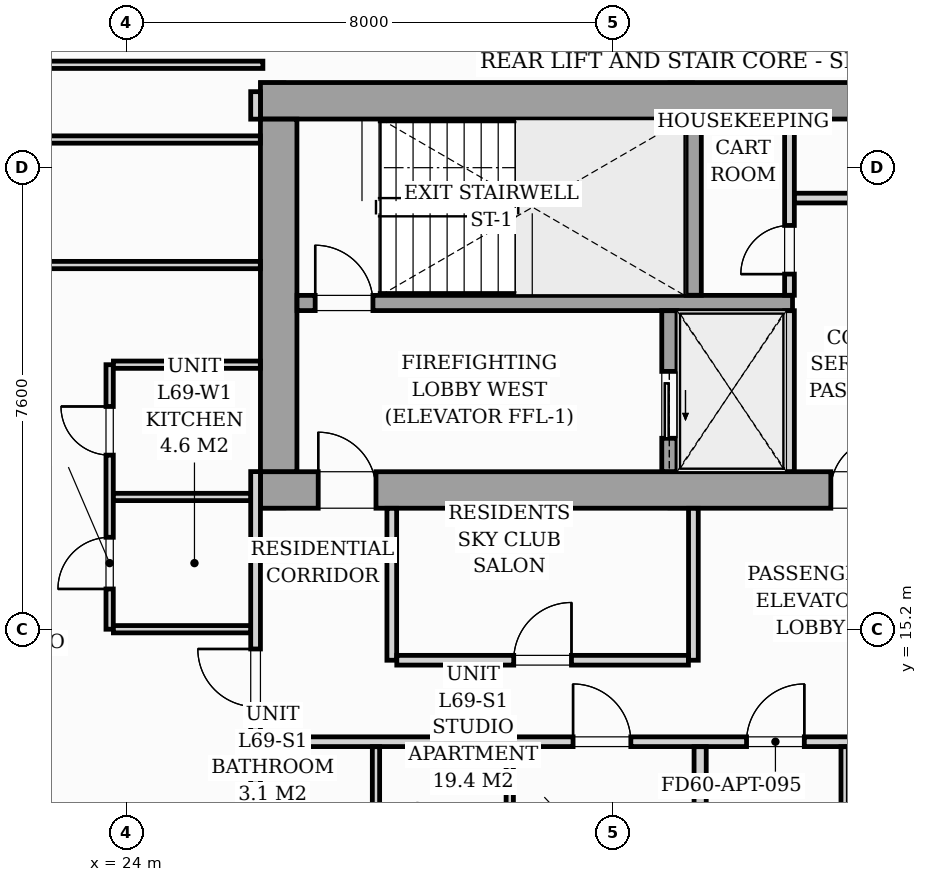
"""IFC4 building model, lengths in metres.
Left out: names, types, materials, properties, quantities, classifications, styles, units other than length and angle.
Written with IfcOpenShell. Run it as: python <this file> out.ifc"""

import sys

from ifc_helpers import new_model, si_unit, direction, frame, frame_2d, origin, origin_2d, place, context, subcontext, project, spatial, rectangle, i_section, extrude, source, transform, mapped, element, fill, save


model = new_model("IFC4")
c1 = context("Model", 3, precision=1e-05, world=origin(), true_north=direction((0.0, 1.0)))
c2 = subcontext(c1, "Body", "Model", "MODEL_VIEW")
j1 = project(units=[si_unit("LENGTHUNIT", "METRE"), si_unit("PLANEANGLEUNIT", "RADIAN")], contexts=[c1])
p1 = place(None, origin())
s1 = spatial("IfcSite", under=j1, at=p1, CompositionType="ELEMENT")
p2 = place(p1, origin())
s2 = spatial("IfcBuilding", under=s1, at=p2, CompositionType="ELEMENT")
p3 = place(p2, frame((0.0, 0.0, 239.7)))
s3 = spatial("IfcBuildingStorey", under=s2, at=p3, CompositionType="ELEMENT", Elevation=239.7)
m1 = source(origin(), c2, "Body", "SweptSolid", [
    extrude(i_section(OverallWidth=0.409, OverallDepth=0.425, WebThickness=0.033, FlangeThickness=0.052, FilletRadius=0.018, at=origin_2d()), origin(), (0.0, 0.0, 1.0), 3.296),
])
for number, where, z_axis, x_axis in (
    (1, (26.4, 17.4, 0.002), (0.0, 0.0, 1.0), (1.0, 0.0, 0.0)),
    (2, (33.12, 17.4, 0.002), (0.0, 0.0, 1.0), (1.0, 0.0, 0.0)),
    (3, (26.4, 24.0, 0.002), (0.0, 0.0, 1.0), (1.0, 0.0, 0.0)),
    (4, (33.12, 24.0, 0.002), (0.0, 0.0, 1.0), (1.0, 0.0, 0.0)),
):
    element("IfcColumn", number, at=place(p3, frame(where, z_axis=z_axis, x_axis=x_axis)), inside=s3, PredefinedType="PILASTER", context=c2, shape_type="MappedRepresentation", body=[
        mapped(m1, transform((0.0, 0.0, 0.0), scale=1.0)),
    ])
p4 = place(p3, frame((26.2, 17.5, 0.0), z_axis=(0.0, 0.0, 1.0), x_axis=(1.0, 0.0, 0.0)))
e5 = element("IfcWall", 5, at=p4, inside=s3, PredefinedType="SHEAR", context=c2, shape_type="SweptSolid", body=[
    extrude(rectangle(XDim=19.6, YDim=0.6, at=frame_2d((9.8, 0.0))), origin(), (0.0, 0.0, 1.0), 3.3),
])
p5 = place(p4, frame((0.95, 0.0, 0.0)))
e6 = element("IfcOpeningElement", 6, at=p5, cuts=e5, PredefinedType="OPENING", context=c2, shape_type="SweptSolid", body=[
    extrude(rectangle(XDim=0.95, YDim=2.06, at=frame_2d((0.475, 1.03))), frame((0.0, 0.31, 0.0), z_axis=(0.0, -1.0, 0.0), x_axis=(1.0, 0.0, 0.0)), (0.0, 0.0, 1.0), 0.62),
])
p6 = place(p4, frame((9.38, 0.0, 0.0)))
e7 = element("IfcOpeningElement", 7, at=p6, cuts=e5, PredefinedType="OPENING", context=c2, shape_type="SweptSolid", body=[
    extrude(rectangle(XDim=0.85, YDim=2.0, at=frame_2d((0.425, 1.0))), frame((0.0, 0.31, 0.0), z_axis=(0.0, -1.0, 0.0), x_axis=(1.0, 0.0, 0.0)), (0.0, 0.0, 1.0), 0.62),
])
p7 = place(p4, frame((17.55, 0.0, 0.0)))
e8 = element("IfcOpeningElement", 8, at=p7, cuts=e5, PredefinedType="OPENING", context=c2, shape_type="SweptSolid", body=[
    extrude(rectangle(XDim=0.95, YDim=2.06, at=frame_2d((0.475, 1.03))), frame((0.0, 0.31, 0.0), z_axis=(0.0, -1.0, 0.0), x_axis=(1.0, 0.0, 0.0)), (0.0, 0.0, 1.0), 0.62),
])
p8 = place(p3, frame((26.2, 23.9, 0.0), z_axis=(0.0, 0.0, 1.0), x_axis=(1.0, 0.0, 0.0)))
e9 = element("IfcWall", 9, at=p8, inside=s3, PredefinedType="SHEAR", context=c2, shape_type="SweptSolid", body=[
    extrude(rectangle(XDim=19.6, YDim=0.6, at=frame_2d((9.8, 0.0))), origin(), (0.0, 0.0, 1.0), 3.3),
])
p9 = place(p3, frame((26.5, 17.802, 0.0), z_axis=(0.0, 0.0, 1.0), x_axis=(0.0, 1.0, 0.0)))
e10 = element("IfcWall", 10, at=p9, inside=s3, PredefinedType="SHEAR", context=c2, shape_type="SweptSolid", body=[
    extrude(rectangle(XDim=5.796, YDim=0.6, at=frame_2d((2.898, 0.0))), origin(), (0.0, 0.0, 1.0), 3.3),
])
p10 = place(p3, frame((26.802, 20.575, 0.0), z_axis=(0.0, 0.0, 1.0), x_axis=(1.0, 0.0, 0.0)))
e11 = element("IfcWall", 11, at=p10, inside=s3, PredefinedType="SOLIDWALL", context=c2, shape_type="SweptSolid", body=[
    extrude(rectangle(XDim=8.148, YDim=0.25, at=frame_2d((4.074, 0.0))), origin(), (0.0, 0.0, 1.0), 3.3),
])
p11 = place(p10, frame((0.298, 0.0, 0.0)))
e12 = element("IfcOpeningElement", 12, at=p11, cuts=e11, PredefinedType="OPENING", context=c2, shape_type="SweptSolid", body=[
    extrude(rectangle(XDim=0.95, YDim=2.06, at=frame_2d((0.475, 1.03))), frame((0.0, 0.135, 0.0), z_axis=(0.0, -1.0, 0.0), x_axis=(1.0, 0.0, 0.0)), (0.0, 0.0, 1.0), 0.27),
])
p12 = place(p3, frame((33.325, 20.702, 0.0), z_axis=(0.0, 0.0, 1.0), x_axis=(0.0, 1.0, 0.0)))
e13 = element("IfcWall", 13, at=p12, inside=s3, PredefinedType="SOLIDWALL", context=c2, shape_type="SweptSolid", body=[
    extrude(rectangle(XDim=2.896, YDim=0.25, at=frame_2d((1.448, 0.0))), origin(), (0.0, 0.0, 1.0), 3.3),
])
p13 = place(p3, frame((32.925, 17.802, 0.0), z_axis=(0.0, 0.0, 1.0), x_axis=(0.0, 1.0, 0.0)))
e14 = element("IfcWall", 14, at=p13, inside=s3, PredefinedType="SOLIDWALL", context=c2, shape_type="SweptSolid", body=[
    extrude(rectangle(XDim=2.646, YDim=0.25, at=frame_2d((1.323, 0.0))), origin(), (0.0, 0.0, 1.0), 3.3),
])
p14 = place(p13, frame((0.548, 0.0, 0.0)))
e15 = element("IfcOpeningElement", 15, at=p14, cuts=e14, PredefinedType="OPENING", context=c2, shape_type="SweptSolid", body=[
    extrude(rectangle(XDim=1.1, YDim=2.08, at=frame_2d((0.55, 1.04))), frame((0.0, 0.135, 0.0), z_axis=(0.0, -1.0, 0.0), x_axis=(1.0, 0.0, 0.0)), (0.0, 0.0, 1.0), 0.27),
])
p15 = place(p3, frame((34.9, 17.802, 0.0), z_axis=(0.0, 0.0, 1.0), x_axis=(0.0, 1.0, 0.0)))
e16 = element("IfcWall", 16, at=p15, inside=s3, PredefinedType="PARTITIONING", context=c2, shape_type="SweptSolid", body=[
    extrude(rectangle(XDim=2.646, YDim=0.16, at=frame_2d((1.323, 0.0))), origin(), (0.0, 0.0, 1.0), 3.04),
])
p16 = place(p3, frame((34.9, 20.702, 0.0), z_axis=(0.0, 0.0, 1.0), x_axis=(0.0, 1.0, 0.0)))
e17 = element("IfcWall", 17, at=p16, inside=s3, PredefinedType="PARTITIONING", context=c2, shape_type="SweptSolid", body=[
    extrude(rectangle(XDim=2.896, YDim=0.16, at=frame_2d((1.448, 0.0))), origin(), (0.0, 0.0, 1.0), 3.04),
])
p17 = place(p16, frame((0.348, 0.0, 0.0)))
e18 = element("IfcOpeningElement", 18, at=p17, cuts=e17, PredefinedType="OPENING", context=c2, shape_type="SweptSolid", body=[
    extrude(rectangle(XDim=0.8, YDim=2.05, at=frame_2d((0.4, 1.025))), frame((0.0, 0.09, 0.0), z_axis=(0.0, -1.0, 0.0), x_axis=(1.0, 0.0, 0.0)), (0.0, 0.0, 1.0), 0.18),
])
p18 = place(p3, frame((34.982, 22.3, 0.0), z_axis=(0.0, 0.0, 1.0), x_axis=(1.0, 0.0, 0.0)))
e19 = element("IfcWall", 19, at=p18, inside=s3, PredefinedType="PARTITIONING", context=c2, shape_type="SweptSolid", body=[
    extrude(rectangle(XDim=3.566, YDim=0.16, at=frame_2d((1.783, 0.0))), origin(), (0.0, 0.0, 1.0), 3.04),
])
p19 = place(p18, frame((1.378, 0.0, 0.0)))
e20 = element("IfcOpeningElement", 20, at=p19, cuts=e19, PredefinedType="OPENING", context=c2, shape_type="SweptSolid", body=[
    extrude(rectangle(XDim=0.8, YDim=2.05, at=frame_2d((0.4, 1.025))), frame((0.0, 0.09, 0.0), z_axis=(0.0, -1.0, 0.0), x_axis=(1.0, 0.0, 0.0)), (0.0, 0.0, 1.0), 0.18),
])
p20 = place(p3, frame((26.12, 13.36, 0.0), z_axis=(0.0, 0.0, 1.0), x_axis=(1.0, 0.0, 0.0)))
e21 = element("IfcWall", 21, at=p20, inside=s3, PredefinedType="PARTITIONING", context=c2, shape_type="SweptSolid", body=[
    extrude(rectangle(XDim=19.76, YDim=0.16, at=frame_2d((9.88, 0.0))), origin(), (0.0, 0.0, 1.0), 2.605),
])
p21 = place(p20, frame((5.221, 0.0, 0.0)))
e22 = element("IfcOpeningElement", 22, at=p21, cuts=e21, PredefinedType="OPENING", context=c2, shape_type="SweptSolid", body=[
    extrude(rectangle(XDim=0.95, YDim=2.06, at=frame_2d((0.475, 1.03))), frame((0.0, 0.09, 0.0), z_axis=(0.0, -1.0, 0.0), x_axis=(1.0, 0.0, 0.0)), (0.0, 0.0, 1.0), 0.18),
])
p22 = place(p20, frame((8.074, 0.0, 0.0)))
e23 = element("IfcOpeningElement", 23, at=p22, cuts=e21, PredefinedType="OPENING", context=c2, shape_type="SweptSolid", body=[
    extrude(rectangle(XDim=0.95, YDim=2.06, at=frame_2d((0.475, 1.03))), frame((0.0, 0.09, 0.0), z_axis=(0.0, -1.0, 0.0), x_axis=(1.0, 0.0, 0.0)), (0.0, 0.0, 1.0), 0.18),
])
p23 = place(p20, frame((18.17, 0.0, 0.0)))
e24 = element("IfcOpeningElement", 24, at=p23, cuts=e21, PredefinedType="OPENING", context=c2, shape_type="SweptSolid", body=[
    extrude(rectangle(XDim=0.95, YDim=2.06, at=frame_2d((0.475, 1.03))), frame((0.0, 0.09, 0.0), z_axis=(0.0, -1.0, 0.0), x_axis=(1.0, 0.0, 0.0)), (0.0, 0.0, 1.0), 0.18),
])
p24 = place(p3, frame((26.12, 9.751, 0.0), z_axis=(0.0, 0.0, 1.0), x_axis=(0.0, 1.0, 0.0)))
e25 = element("IfcWall", 25, at=p24, inside=s3, PredefinedType="PARTITIONING", context=c2, shape_type="SweptSolid", body=[
    extrude(rectangle(XDim=3.527, YDim=0.16, at=frame_2d((1.763, 0.0))), origin(), (0.0, 0.0, 1.0), 3.04),
])
p25 = place(p3, frame((26.12, 13.442, 0.0), z_axis=(0.0, 0.0, 1.0), x_axis=(0.0, 1.0, 0.0)))
e26 = element("IfcWall", 26, at=p25, inside=s3, PredefinedType="PARTITIONING", context=c2, shape_type="SweptSolid", body=[
    extrude(rectangle(XDim=4.36, YDim=0.16, at=frame_2d((2.18, 0.0))), origin(), (0.0, 0.0, 1.0), 3.04),
])
p26 = place(p25, frame((0.493, 0.0, 0.0)))
e27 = element("IfcOpeningElement", 27, at=p26, cuts=e26, PredefinedType="OPENING", context=c2, shape_type="SweptSolid", body=[
    extrude(rectangle(XDim=0.95, YDim=2.06, at=frame_2d((0.475, 1.03))), frame((0.0, 0.09, 0.0), z_axis=(0.0, -1.0, 0.0), x_axis=(1.0, 0.0, 0.0)), (0.0, 0.0, 1.0), 0.18),
])
p27 = place(p3, frame((26.12, 23.598, 0.0), z_axis=(0.0, 0.0, 1.0), x_axis=(0.0, 1.0, 0.0)))
e28 = element("IfcWall", 28, at=p27, inside=s3, PredefinedType="PARTITIONING", context=c2, shape_type="SweptSolid", body=[
    extrude(rectangle(XDim=0.452, YDim=0.16, at=frame_2d((0.226, 0.0))), origin(), (0.0, 0.0, 1.0), 3.04),
])
for number, where, z_axis, x_axis in (
    (29, (30.3, 11.572, 0.0), (0.0, 0.0, 1.0), (0.0, 1.0, 0.0)),
    (30, (28.1, 11.572, 0.0), (0.0, 0.0, 1.0), (0.0, 1.0, 0.0)),
):
    element("IfcWall", number, at=place(p3, frame(where, z_axis=z_axis, x_axis=x_axis)), inside=s3, PredefinedType="PARTITIONING", context=c2, shape_type="SweptSolid", body=[
        extrude(rectangle(XDim=1.706, YDim=0.12, at=frame_2d((0.853, 0.0))), origin(), (0.0, 0.0, 1.0), 3.04),
    ])
p28 = place(p3, frame((33.431, 9.086, 0.0), z_axis=(0.0, 0.0, 1.0), x_axis=(0.0, 1.0, 0.0)))
e31 = element("IfcWall", 31, at=p28, inside=s3, PredefinedType="PARTITIONING", context=c2, shape_type="SweptSolid", body=[
    extrude(rectangle(XDim=4.192, YDim=0.2, at=frame_2d((2.096, 0.0))), origin(), (0.0, 0.0, 1.0), 3.04),
])
p29 = place(p3, frame((35.807, 11.311, 0.0), z_axis=(0.0, 0.0, 1.0), x_axis=(0.0, 1.0, 0.0)))
e32 = element("IfcWall", 32, at=p29, inside=s3, PredefinedType="PARTITIONING", context=c2, shape_type="SweptSolid", body=[
    extrude(rectangle(XDim=1.967, YDim=0.12, at=frame_2d((0.983, 0.0))), origin(), (0.0, 0.0, 1.0), 3.04),
])
p30 = place(p3, frame((23.72, 15.21, 0.0), z_axis=(0.0, 0.0, 1.0), x_axis=(0.0, 1.0, 0.0)))
e33 = element("IfcWall", 33, at=p30, inside=s3, PredefinedType="PARTITIONING", context=c2, shape_type="SweptSolid", body=[
    extrude(rectangle(XDim=4.35, YDim=0.12, at=frame_2d((2.175, 0.0))), origin(), (0.0, 0.0, 1.0), 3.04),
])
p31 = place(p30, frame((0.662, 0.0, 0.0)))
e34 = element("IfcOpeningElement", 34, at=p31, cuts=e33, PredefinedType="OPENING", context=c2, shape_type="SweptSolid", body=[
    extrude(rectangle(XDim=0.85, YDim=2.05, at=frame_2d((0.425, 1.025))), frame((0.0, 0.07, 0.0), z_axis=(0.0, -1.0, 0.0), x_axis=(1.0, 0.0, 0.0)), (0.0, 0.0, 1.0), 0.14),
])
p32 = place(p30, frame((2.863, 0.0, 0.0)))
e35 = element("IfcOpeningElement", 35, at=p32, cuts=e33, PredefinedType="OPENING", context=c2, shape_type="SweptSolid", body=[
    extrude(rectangle(XDim=0.8, YDim=2.02, at=frame_2d((0.4, 1.01))), frame((0.0, 0.07, 0.0), z_axis=(0.0, -1.0, 0.0), x_axis=(1.0, 0.0, 0.0)), (0.0, 0.0, 1.0), 0.14),
])
p33 = place(p3, frame((23.782, 17.385, 0.0), z_axis=(0.0, 0.0, 1.0), x_axis=(1.0, 0.0, 0.0)))
e36 = element("IfcWall", 36, at=p33, inside=s3, PredefinedType="PARTITIONING", context=c2, shape_type="SweptSolid", body=[
    extrude(rectangle(XDim=2.256, YDim=0.12, at=frame_2d((1.128, 0.0))), origin(), (0.0, 0.0, 1.0), 2.381),
])
p34 = place(p3, frame((23.782, 15.21, 0.0), z_axis=(0.0, 0.0, 1.0), x_axis=(1.0, 0.0, 0.0)))
e37 = element("IfcWall", 37, at=p34, inside=s3, PredefinedType="PARTITIONING", context=c2, shape_type="SweptSolid", body=[
    extrude(rectangle(XDim=2.256, YDim=0.12, at=frame_2d((1.128, 0.0))), origin(), (0.0, 0.0, 1.0), 3.04),
])
p35 = place(p3, frame((23.782, 19.56, 0.0), z_axis=(0.0, 0.0, 1.0), x_axis=(1.0, 0.0, 0.0)))
e38 = element("IfcWall", 38, at=p35, inside=s3, PredefinedType="PARTITIONING", context=c2, shape_type="SweptSolid", body=[
    extrude(rectangle(XDim=2.416, YDim=0.12, at=frame_2d((1.208, 0.0))), origin(), (0.0, 0.0, 1.0), 3.04),
])
p36 = place(p3, frame((9.975, 24.492, 0.0), z_axis=(0.0, 0.0, 1.0), x_axis=(1.0, 0.0, 0.0)))
e39 = element("IfcWall", 39, at=p36, inside=s3, PredefinedType="PARTITIONING", context=c2, shape_type="SweptSolid", body=[
    extrude(rectangle(XDim=16.265, YDim=0.12, at=frame_2d((8.133, 0.0))), origin(), (0.0, 0.0, 1.0), 3.04),
])
p37 = place(p36, frame((9.748, 0.0, 0.0)))
e40 = element("IfcOpeningElement", 40, at=p37, cuts=e39, PredefinedType="OPENING", context=c2, shape_type="SweptSolid", body=[
    extrude(rectangle(XDim=0.85, YDim=2.05, at=frame_2d((0.425, 1.025))), frame((0.0, 0.07, 0.0), z_axis=(0.0, -1.0, 0.0), x_axis=(1.0, 0.0, 0.0)), (0.0, 0.0, 1.0), 0.14),
])
p38 = place(p3, frame((9.863, 23.263, 0.0), z_axis=(0.0, 0.0, 1.0), x_axis=(1.0, 0.0, 0.0)))
e41 = element("IfcWall", 41, at=p38, inside=s3, PredefinedType="PARTITIONING", context=c2, shape_type="SweptSolid", body=[
    extrude(rectangle(XDim=16.335, YDim=0.12, at=frame_2d((8.168, 0.0))), origin(), (0.0, 0.0, 1.0), 3.04),
])
p39 = place(p38, frame((9.859, 0.0, 0.0)))
e42 = element("IfcOpeningElement", 42, at=p39, cuts=e41, PredefinedType="OPENING", context=c2, shape_type="SweptSolid", body=[
    extrude(rectangle(XDim=0.85, YDim=2.05, at=frame_2d((0.425, 1.025))), frame((0.0, 0.07, 0.0), z_axis=(0.0, -1.0, 0.0), x_axis=(1.0, 0.0, 0.0)), (0.0, 0.0, 1.0), 0.14),
])
p40 = place(p3, frame((9.675, 21.199, 0.0), z_axis=(0.0, 0.0, 1.0), x_axis=(1.0, 0.0, 0.0)))
e43 = element("IfcWall", 43, at=p40, inside=s3, PredefinedType="PARTITIONING", context=c2, shape_type="SweptSolid", body=[
    extrude(rectangle(XDim=16.523, YDim=0.12, at=frame_2d((8.262, 0.0))), origin(), (0.0, 0.0, 1.0), 3.04),
])
p41 = place(p40, frame((10.047, 0.0, 0.0)))
e44 = element("IfcOpeningElement", 44, at=p41, cuts=e43, PredefinedType="OPENING", context=c2, shape_type="SweptSolid", body=[
    extrude(rectangle(XDim=0.85, YDim=2.05, at=frame_2d((0.425, 1.025))), frame((0.0, 0.07, 0.0), z_axis=(0.0, -1.0, 0.0), x_axis=(1.0, 0.0, 0.0)), (0.0, 0.0, 1.0), 0.14),
])
for number, where, z_axis, x_axis in (
    (45, (28.36, 14.7, 0.0), (0.0, 0.0, 1.0), (0.0, 1.0, 0.0)),
    (46, (33.32, 14.7, 0.0), (0.0, 0.0, 1.0), (0.0, 1.0, 0.0)),
):
    element("IfcWall", number, at=place(p3, frame(where, z_axis=z_axis, x_axis=x_axis)), inside=s3, PredefinedType="PARTITIONING", context=c2, shape_type="SweptSolid", body=[
        extrude(rectangle(XDim=2.498, YDim=0.16, at=frame_2d((1.249, 0.0))), origin(), (0.0, 0.0, 1.0), 3.04),
    ])
p42 = place(p3, frame((28.442, 14.7, 0.0), z_axis=(0.0, 0.0, 1.0), x_axis=(1.0, 0.0, 0.0)))
e47 = element("IfcWall", 47, at=p42, inside=s3, PredefinedType="PARTITIONING", context=c2, shape_type="SweptSolid", body=[
    extrude(rectangle(XDim=4.796, YDim=0.16, at=frame_2d((2.398, 0.0))), origin(), (0.0, 0.0, 1.0), 2.605),
])
p43 = place(p42, frame((1.923, 0.0, 0.0)))
e48 = element("IfcOpeningElement", 48, at=p43, cuts=e47, PredefinedType="OPENING", context=c2, shape_type="SweptSolid", body=[
    extrude(rectangle(XDim=0.95, YDim=2.06, at=frame_2d((0.475, 1.03))), frame((0.0, 0.09, 0.0), z_axis=(0.0, -1.0, 0.0), x_axis=(1.0, 0.0, 0.0)), (0.0, 0.0, 1.0), 0.18),
])
m2 = source(origin(), c2, "Body", "SweptSolid", [
    extrude(rectangle(XDim=0.95, YDim=2.06, at=frame_2d((0.475, 1.03))), frame((0.0, 0.025, 0.0), z_axis=(0.0, -1.0, 0.0), x_axis=(1.0, 0.0, 0.0)), (0.0, 0.0, 1.0), 0.05),
])
p44 = place(p5, origin())
e49 = element("IfcDoor", 49, at=p44, inside=s3, OperationType="SINGLE_SWING_LEFT", PredefinedType="DOOR", context=c2, shape_type="MappedRepresentation", body=[
    mapped(m2, transform((0.0, 0.0, 0.0), scale=1.0)),
])
fill(e6, e49)
m3 = source(origin(), c2, "Body", "SweptSolid", [
    extrude(rectangle(XDim=0.85, YDim=2.0, at=frame_2d((0.425, 1.0))), frame((0.0, 0.025, 0.0), z_axis=(0.0, -1.0, 0.0), x_axis=(1.0, 0.0, 0.0)), (0.0, 0.0, 1.0), 0.05),
])
p45 = place(p6, origin())
e50 = element("IfcDoor", 50, at=p45, inside=s3, OperationType="SINGLE_SWING_RIGHT", PredefinedType="DOOR", context=c2, shape_type="MappedRepresentation", body=[
    mapped(m3, transform((0.0, 0.0, 0.0), scale=1.0)),
])
fill(e7, e50)
p46 = place(p11, origin())
e51 = element("IfcDoor", 51, at=p46, inside=s3, OperationType="SINGLE_SWING_LEFT", PredefinedType="DOOR", context=c2, shape_type="MappedRepresentation", body=[
    mapped(m2, transform((0.0, 0.0, 0.0), scale=1.0)),
])
fill(e12, e51)
m4 = source(origin(), c2, "Body", "SweptSolid", [
    extrude(rectangle(XDim=1.1, YDim=2.08, at=frame_2d((0.55, 1.04))), frame((0.0, 0.025, 0.0), z_axis=(0.0, -1.0, 0.0), x_axis=(1.0, 0.0, 0.0)), (0.0, 0.0, 1.0), 0.05),
])
p47 = place(p14, origin())
e52 = element("IfcDoor", 52, at=p47, inside=s3, OperationType="SLIDING_TO_LEFT", PredefinedType="DOOR", context=c2, shape_type="MappedRepresentation", body=[
    mapped(m4, transform((0.0, 0.0, 0.0), scale=1.0)),
])
fill(e15, e52)
m5 = source(origin(), c2, "Body", "SweptSolid", [
    extrude(rectangle(XDim=0.8, YDim=2.05, at=frame_2d((0.4, 1.025))), frame((0.0, 0.025, 0.0), z_axis=(0.0, -1.0, 0.0), x_axis=(1.0, 0.0, 0.0)), (0.0, 0.0, 1.0), 0.05),
])
p48 = place(p17, origin())
e53 = element("IfcDoor", 53, at=p48, inside=s3, OperationType="SINGLE_SWING_LEFT", PredefinedType="DOOR", context=c2, shape_type="MappedRepresentation", body=[
    mapped(m5, transform((0.0, 0.0, 0.0), scale=1.0)),
])
fill(e18, e53)
m6 = source(origin(), c2, "Body", "SweptSolid", [
    extrude(rectangle(XDim=0.95, YDim=2.06, at=frame_2d((0.475, 1.03))), frame((0.0, 0.025, 0.0), z_axis=(0.0, -1.0, 0.0), x_axis=(1.0, 0.0, 0.0)), (0.0, 0.0, 1.0), 0.05),
])
p49 = place(p21, origin())
e54 = element("IfcDoor", 54, at=p49, inside=s3, OperationType="SINGLE_SWING_LEFT", PredefinedType="DOOR", context=c2, shape_type="MappedRepresentation", body=[
    mapped(m6, transform((0.0, 0.0, 0.0), scale=1.0)),
])
fill(e22, e54)
p50 = place(p22, origin())
e55 = element("IfcDoor", 55, at=p50, inside=s3, OperationType="SINGLE_SWING_RIGHT", PredefinedType="DOOR", context=c2, shape_type="MappedRepresentation", body=[
    mapped(m6, transform((0.0, 0.0, 0.0), scale=1.0)),
])
fill(e23, e55)
p51 = place(p26, origin())
e56 = element("IfcDoor", 56, at=p51, inside=s3, OperationType="SINGLE_SWING_RIGHT", PredefinedType="DOOR", context=c2, shape_type="MappedRepresentation", body=[
    mapped(m6, transform((0.0, 0.0, 0.0), scale=1.0)),
])
fill(e27, e56)
m7 = source(origin(), c2, "Body", "SweptSolid", [
    extrude(rectangle(XDim=0.85, YDim=2.05, at=frame_2d((0.425, 1.025))), frame((0.0, 0.025, 0.0), z_axis=(0.0, -1.0, 0.0), x_axis=(1.0, 0.0, 0.0)), (0.0, 0.0, 1.0), 0.05),
])
p52 = place(p31, origin())
e57 = element("IfcDoor", 57, at=p52, inside=s3, OperationType="SINGLE_SWING_LEFT", PredefinedType="DOOR", context=c2, shape_type="MappedRepresentation", body=[
    mapped(m7, transform((0.0, 0.0, 0.0), scale=1.0)),
])
fill(e34, e57)
m8 = source(origin(), c2, "Body", "SweptSolid", [
    extrude(rectangle(XDim=0.8, YDim=2.02, at=frame_2d((0.4, 1.01))), frame((0.0, 0.025, 0.0), z_axis=(0.0, -1.0, 0.0), x_axis=(1.0, 0.0, 0.0)), (0.0, 0.0, 1.0), 0.05),
])
p53 = place(p32, origin())
e58 = element("IfcDoor", 58, at=p53, inside=s3, OperationType="SINGLE_SWING_RIGHT", PredefinedType="DOOR", context=c2, shape_type="MappedRepresentation", body=[
    mapped(m8, transform((0.0, 0.0, 0.0), scale=1.0)),
])
fill(e35, e58)
p54 = place(p43, origin())
e59 = element("IfcDoor", 59, at=p54, inside=s3, OperationType="SINGLE_SWING_RIGHT", PredefinedType="DOOR", context=c2, shape_type="MappedRepresentation", body=[
    mapped(m6, transform((0.0, 0.0, 0.0), scale=1.0)),
])
fill(e48, e59)
save(model, sys.argv[1])
